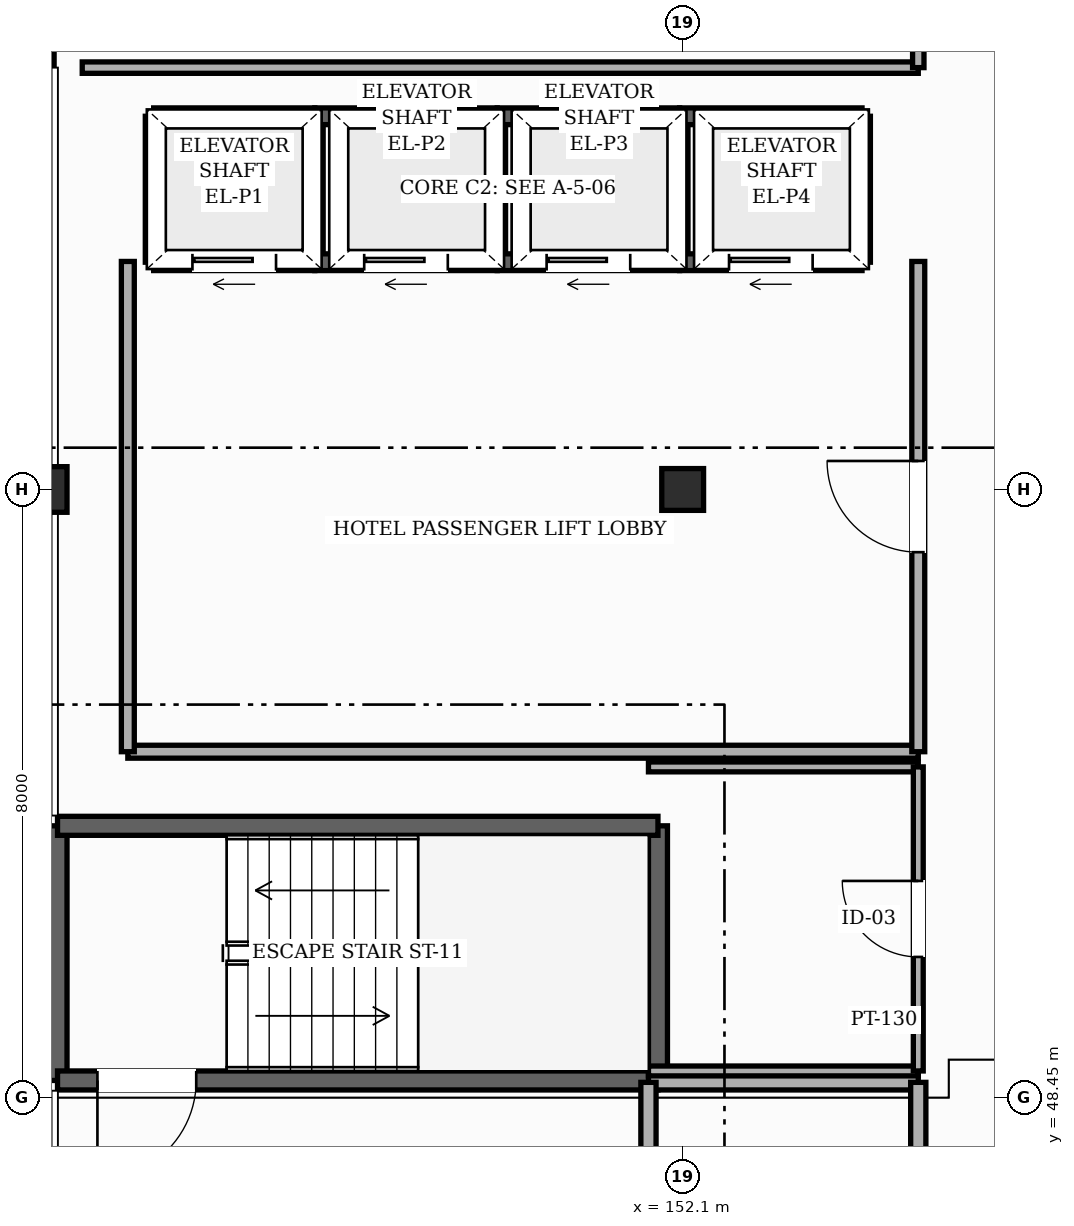
"""IFC4 building model, lengths in metres.
Left out: names, types, materials, properties, quantities, classifications, styles, units other than length and angle.
Written with IfcOpenShell. Run it as: python <this file> out.ifc"""

import sys

from ifc_helpers import new_model, si_unit, direction, frame, frame_2d, origin, origin_2d, place, context, subcontext, project, spatial, rectangle, hollow_rectangle, extrude, element, fill, save


model = new_model("IFC4")
c1 = context("Model", 3, precision=1e-05, world=origin(), true_north=direction((0.0, 1.0)))
c2 = subcontext(c1, "Body", "Model", "MODEL_VIEW")
j1 = project(units=[si_unit("LENGTHUNIT", "METRE"), si_unit("PLANEANGLEUNIT", "RADIAN")], contexts=[c1])
p1 = place(None, origin())
s1 = spatial("IfcSite", under=j1, at=p1, CompositionType="ELEMENT")
p2 = place(p1, origin())
s2 = spatial("IfcBuilding", under=s1, at=p2, CompositionType="ELEMENT")
p3 = place(p2, frame((0.0, 0.0, 24.6)))
s3 = spatial("IfcBuildingStorey", under=s2, at=p3, CompositionType="ELEMENT", Elevation=24.6)
p4 = place(p3, frame((143.7, 56.45, 0.0), z_axis=(0.0, 0.0, 1.0), x_axis=(1.0, 0.0, 0.0)))
e1 = element("IfcColumn", 1, at=p4, inside=s3, PredefinedType="COLUMN", context=c2, shape_type="SweptSolid", body=[
    extrude(hollow_rectangle(XDim=0.6, YDim=0.6, WallThickness=0.025, InnerFilletRadius=0.025, OuterFilletRadius=0.05, at=origin_2d()), origin(), (0.0, 0.0, 1.0), 3.6),
])
p5 = place(p3, frame((152.1, 56.45, 0.0), z_axis=(0.0, 0.0, 1.0), x_axis=(1.0, 0.0, 0.0)))
e2 = element("IfcColumn", 2, at=p5, inside=s3, PredefinedType="COLUMN", context=c2, shape_type="SweptSolid", body=[
    extrude(hollow_rectangle(XDim=0.55, YDim=0.55, WallThickness=0.022, InnerFilletRadius=0.022, OuterFilletRadius=0.044, at=origin_2d()), origin(), (0.0, 0.0, 1.0), 3.6),
])
p6 = place(p3, frame((143.7, 62.0, 0.0), z_axis=(0.0, 0.0, 1.0), x_axis=(0.0, 1.0, 0.0)))
e3 = element("IfcWall", 3, at=p6, inside=s3, PredefinedType="SOLIDWALL", context=c2, shape_type="SweptSolid", body=[
    extrude(rectangle(XDim=2.15, YDim=0.26, at=frame_2d((1.075, 0.0))), origin(), (0.0, 0.0, 1.0), 2.805),
])
p7 = place(p6, frame((0.15, 0.0, 0.85)))
e4 = element("IfcOpeningElement", 4, at=p7, cuts=e3, PredefinedType="OPENING", context=c2, shape_type="SweptSolid", body=[
    extrude(rectangle(XDim=1.85, YDim=1.35, at=frame_2d((0.925, 0.675))), frame((0.0, 0.14, 0.0), z_axis=(0.0, -1.0, 0.0), x_axis=(1.0, 0.0, 0.0)), (0.0, 0.0, 1.0), 0.28),
])
for number, where, z_axis, x_axis in (
    (5, (143.875, 48.675, 0.0), (0.0, 0.0, 1.0), (0.0, 1.0, 0.0)),
    (6, (151.775, 52.025, 0.0), (0.0, 0.0, 1.0), (0.0, -1.0, 0.0)),
):
    element("IfcWall", number, at=place(p3, frame(where, z_axis=z_axis, x_axis=x_axis)), inside=s3, PredefinedType="SHEAR", context=c2, shape_type="SweptSolid", body=[
        extrude(rectangle(XDim=3.35, YDim=0.25, at=frame_2d((1.675, 0.0))), origin(), (0.0, 0.0, 1.0), 3.38),
    ])
p8 = place(p3, frame((151.775, 48.675, 0.0), z_axis=(0.0, 0.0, 1.0), x_axis=(-1.0, 0.0, 0.0)))
e7 = element("IfcWall", 7, at=p8, inside=s3, PredefinedType="SHEAR", context=c2, shape_type="SweptSolid", body=[
    extrude(rectangle(XDim=7.9, YDim=0.25, at=frame_2d((3.95, 0.0))), origin(), (0.0, 0.0, 1.0), 3.38),
])
p9 = place(p8, frame((6.075, 0.0, 0.0)))
e8 = element("IfcOpeningElement", 8, at=p9, cuts=e7, PredefinedType="OPENING", context=c2, shape_type="SweptSolid", body=[
    extrude(rectangle(XDim=1.3, YDim=2.2, at=frame_2d((0.65, 1.1))), frame((0.0, 0.135, 0.0), z_axis=(0.0, -1.0, 0.0), x_axis=(1.0, 0.0, 0.0)), (0.0, 0.0, 1.0), 0.27),
])
p10 = place(p3, frame((143.875, 52.025, 0.0), z_axis=(0.0, 0.0, 1.0), x_axis=(1.0, 0.0, 0.0)))
e9 = element("IfcWall", 9, at=p10, inside=s3, PredefinedType="SHEAR", context=c2, shape_type="SweptSolid", body=[
    extrude(rectangle(XDim=7.9, YDim=0.25, at=frame_2d((3.95, 0.0))), origin(), (0.0, 0.0, 1.0), 3.38),
])
p11 = place(p3, frame((145.14, 61.36, 0.0), z_axis=(0.0, 0.0, 1.0), x_axis=(1.0, 0.0, 0.0)))
e10 = element("IfcWall", 10, at=p11, inside=s3, PredefinedType="SHEAR", context=c2, shape_type="SweptSolid", body=[
    extrude(rectangle(XDim=2.12, YDim=0.22, at=frame_2d((1.06, 0.0))), origin(), (0.0, 0.0, 1.0), 3.38),
])
p12 = place(p3, frame((145.14, 59.44, 0.0), z_axis=(0.0, 0.0, 1.0), x_axis=(1.0, 0.0, 0.0)))
e11 = element("IfcWall", 11, at=p12, inside=s3, PredefinedType="SHEAR", context=c2, shape_type="SweptSolid", body=[
    extrude(rectangle(XDim=2.12, YDim=0.22, at=frame_2d((1.06, 0.0))), origin(), (0.0, 0.0, 1.0), 3.38),
])
p13 = place(p12, frame((0.51, 0.0, 0.0)))
e12 = element("IfcOpeningElement", 12, at=p13, cuts=e11, PredefinedType="OPENING", context=c2, shape_type="SweptSolid", body=[
    extrude(rectangle(XDim=1.1, YDim=2.2, at=frame_2d((0.55, 1.1))), frame((0.0, 0.12, 0.0), z_axis=(0.0, -1.0, 0.0), x_axis=(1.0, 0.0, 0.0)), (0.0, 0.0, 1.0), 0.24),
])
for number, where, z_axis, x_axis in (
    (13, (147.26, 59.44, 0.0), (0.0, 0.0, 1.0), (0.0, 1.0, 0.0)),
    (14, (145.14, 59.44, 0.0), (0.0, 0.0, 1.0), (0.0, 1.0, 0.0)),
):
    element("IfcWall", number, at=place(p3, frame(where, z_axis=z_axis, x_axis=x_axis)), inside=s3, PredefinedType="SHEAR", context=c2, shape_type="SweptSolid", body=[
        extrude(rectangle(XDim=1.92, YDim=0.22, at=frame_2d((0.96, 0.0))), origin(), (0.0, 0.0, 1.0), 3.38),
    ])
p14 = place(p3, frame((147.26, 61.36, 0.0), z_axis=(0.0, 0.0, 1.0), x_axis=(1.0, 0.0, 0.0)))
e15 = element("IfcWall", 15, at=p14, inside=s3, PredefinedType="SHEAR", context=c2, shape_type="SweptSolid", body=[
    extrude(rectangle(XDim=2.4, YDim=0.22, at=frame_2d((1.2, 0.0))), origin(), (0.0, 0.0, 1.0), 3.38),
])
p15 = place(p3, frame((147.26, 59.44, 0.0), z_axis=(0.0, 0.0, 1.0), x_axis=(1.0, 0.0, 0.0)))
e16 = element("IfcWall", 16, at=p15, inside=s3, PredefinedType="SHEAR", context=c2, shape_type="SweptSolid", body=[
    extrude(rectangle(XDim=2.4, YDim=0.22, at=frame_2d((1.2, 0.0))), origin(), (0.0, 0.0, 1.0), 3.38),
])
p16 = place(p15, frame((0.65, 0.0, 0.0)))
e17 = element("IfcOpeningElement", 17, at=p16, cuts=e16, PredefinedType="OPENING", context=c2, shape_type="SweptSolid", body=[
    extrude(rectangle(XDim=1.1, YDim=2.2, at=frame_2d((0.55, 1.1))), frame((0.0, 0.12, 0.0), z_axis=(0.0, -1.0, 0.0), x_axis=(1.0, 0.0, 0.0)), (0.0, 0.0, 1.0), 0.24),
])
p17 = place(p3, frame((149.66, 59.44, 0.0), z_axis=(0.0, 0.0, 1.0), x_axis=(0.0, 1.0, 0.0)))
e18 = element("IfcWall", 18, at=p17, inside=s3, PredefinedType="SHEAR", context=c2, shape_type="SweptSolid", body=[
    extrude(rectangle(XDim=1.92, YDim=0.22, at=frame_2d((0.96, 0.0))), origin(), (0.0, 0.0, 1.0), 3.38),
])
p18 = place(p3, frame((149.66, 61.36, 0.0), z_axis=(0.0, 0.0, 1.0), x_axis=(1.0, 0.0, 0.0)))
e19 = element("IfcWall", 19, at=p18, inside=s3, PredefinedType="SHEAR", context=c2, shape_type="SweptSolid", body=[
    extrude(rectangle(XDim=2.4, YDim=0.22, at=frame_2d((1.2, 0.0))), origin(), (0.0, 0.0, 1.0), 3.38),
])
p19 = place(p3, frame((149.66, 59.44, 0.0), z_axis=(0.0, 0.0, 1.0), x_axis=(1.0, 0.0, 0.0)))
e20 = element("IfcWall", 20, at=p19, inside=s3, PredefinedType="SHEAR", context=c2, shape_type="SweptSolid", body=[
    extrude(rectangle(XDim=2.4, YDim=0.22, at=frame_2d((1.2, 0.0))), origin(), (0.0, 0.0, 1.0), 3.38),
])
p20 = place(p19, frame((0.65, 0.0, 0.0)))
e21 = element("IfcOpeningElement", 21, at=p20, cuts=e20, PredefinedType="OPENING", context=c2, shape_type="SweptSolid", body=[
    extrude(rectangle(XDim=1.1, YDim=2.2, at=frame_2d((0.55, 1.1))), frame((0.0, 0.12, 0.0), z_axis=(0.0, -1.0, 0.0), x_axis=(1.0, 0.0, 0.0)), (0.0, 0.0, 1.0), 0.24),
])
p21 = place(p3, frame((152.06, 59.44, 0.0), z_axis=(0.0, 0.0, 1.0), x_axis=(0.0, 1.0, 0.0)))
e22 = element("IfcWall", 22, at=p21, inside=s3, PredefinedType="SHEAR", context=c2, shape_type="SweptSolid", body=[
    extrude(rectangle(XDim=1.92, YDim=0.22, at=frame_2d((0.96, 0.0))), origin(), (0.0, 0.0, 1.0), 3.38),
])
p22 = place(p3, frame((152.06, 61.36, 0.0), z_axis=(0.0, 0.0, 1.0), x_axis=(1.0, 0.0, 0.0)))
e23 = element("IfcWall", 23, at=p22, inside=s3, PredefinedType="SHEAR", context=c2, shape_type="SweptSolid", body=[
    extrude(rectangle(XDim=2.4, YDim=0.22, at=frame_2d((1.2, 0.0))), origin(), (0.0, 0.0, 1.0), 3.38),
])
p23 = place(p3, frame((152.06, 59.44, 0.0), z_axis=(0.0, 0.0, 1.0), x_axis=(1.0, 0.0, 0.0)))
e24 = element("IfcWall", 24, at=p23, inside=s3, PredefinedType="SHEAR", context=c2, shape_type="SweptSolid", body=[
    extrude(rectangle(XDim=2.4, YDim=0.22, at=frame_2d((1.2, 0.0))), origin(), (0.0, 0.0, 1.0), 3.38),
])
p24 = place(p23, frame((0.65, 0.0, 0.0)))
e25 = element("IfcOpeningElement", 25, at=p24, cuts=e24, PredefinedType="OPENING", context=c2, shape_type="SweptSolid", body=[
    extrude(rectangle(XDim=1.1, YDim=2.2, at=frame_2d((0.55, 1.1))), frame((0.0, 0.12, 0.0), z_axis=(0.0, -1.0, 0.0), x_axis=(1.0, 0.0, 0.0)), (0.0, 0.0, 1.0), 0.24),
])
p25 = place(p3, frame((154.46, 59.44, 0.0), z_axis=(0.0, 0.0, 1.0), x_axis=(0.0, 1.0, 0.0)))
e26 = element("IfcWall", 26, at=p25, inside=s3, PredefinedType="SHEAR", context=c2, shape_type="SweptSolid", body=[
    extrude(rectangle(XDim=1.92, YDim=0.22, at=frame_2d((0.96, 0.0))), origin(), (0.0, 0.0, 1.0), 3.38),
])
p26 = place(p3, frame((151.65, 48.65, 0.0), z_axis=(0.0, 0.0, 1.0), x_axis=(1.0, 0.0, 0.0)))
e27 = element("IfcWall", 27, at=p26, inside=s3, PredefinedType="SOLIDWALL", context=c2, shape_type="SweptSolid", body=[
    extrude(rectangle(XDim=3.55, YDim=0.2, at=frame_2d((1.775, 0.0))), origin(), (0.0, 0.0, 1.0), 3.365),
])
for number, where, z_axis, x_axis in (
    (28, (151.65, 48.8, 0.0), (0.0, 0.0, 1.0), (1.0, 0.0, 0.0)),
    (29, (151.65, 52.8, 0.0), (0.0, 0.0, 1.0), (1.0, 0.0, 0.0)),
):
    element("IfcWall", number, at=place(p3, frame(where, z_axis=z_axis, x_axis=x_axis)), inside=s3, PredefinedType="PARTITIONING", context=c2, shape_type="SweptSolid", body=[
        extrude(rectangle(XDim=3.55, YDim=0.13, at=frame_2d((1.775, 0.0))), origin(), (0.0, 0.0, 1.0), 3.365),
    ])
p27 = place(p3, frame((144.8, 53.0, 0.0), z_axis=(0.0, 0.0, 1.0), x_axis=(1.0, 0.0, 0.0)))
e30 = element("IfcWall", 30, at=p27, inside=s3, PredefinedType="PARTITIONING", context=c2, shape_type="SweptSolid", body=[
    extrude(rectangle(XDim=10.4, YDim=0.17, at=frame_2d((5.2, 0.0))), origin(), (0.0, 0.0, 1.0), 3.365),
])
p28 = place(p3, frame((144.2, 62.0, 0.0), z_axis=(0.0, 0.0, 1.0), x_axis=(1.0, 0.0, 0.0)))
e31 = element("IfcWall", 31, at=p28, inside=s3, PredefinedType="PARTITIONING", context=c2, shape_type="SweptSolid", body=[
    extrude(rectangle(XDim=11.0, YDim=0.15, at=frame_2d((5.5, 0.0))), origin(), (0.0, 0.0, 1.0), 3.365),
])
p29 = place(p3, frame((144.8, 53.0, 0.0), z_axis=(0.0, 0.0, 1.0), x_axis=(0.0, 1.0, 0.0)))
e32 = element("IfcWall", 32, at=p29, inside=s3, PredefinedType="PARTITIONING", context=c2, shape_type="SweptSolid", body=[
    extrude(rectangle(XDim=6.45, YDim=0.17, at=frame_2d((3.225, 0.0))), origin(), (0.0, 0.0, 1.0), 3.365),
])
p30 = place(p3, frame((151.65, 44.1, 0.0), z_axis=(0.0, 0.0, 1.0), x_axis=(0.0, 1.0, 0.0)))
e33 = element("IfcWall", 33, at=p30, inside=s3, PredefinedType="SOLIDWALL", context=c2, shape_type="SweptSolid", body=[
    extrude(rectangle(XDim=4.55, YDim=0.2, at=frame_2d((2.275, 0.0))), origin(), (0.0, 0.0, 1.0), 3.365),
])
p31 = place(p30, frame((1.625, 0.0, 0.0)))
e34 = element("IfcOpeningElement", 34, at=p31, cuts=e33, PredefinedType="OPENING", context=c2, shape_type="SweptSolid", body=[
    extrude(rectangle(XDim=1.3, YDim=2.2, at=frame_2d((0.65, 1.1))), frame((0.0, 0.11, 0.0), z_axis=(0.0, -1.0, 0.0), x_axis=(1.0, 0.0, 0.0)), (0.0, 0.0, 1.0), 0.22),
])
p32 = place(p3, frame((155.2, 44.1, 0.0), z_axis=(0.0, 0.0, 1.0), x_axis=(0.0, 1.0, 0.0)))
e35 = element("IfcWall", 35, at=p32, inside=s3, PredefinedType="SOLIDWALL", context=c2, shape_type="SweptSolid", body=[
    extrude(rectangle(XDim=4.55, YDim=0.2, at=frame_2d((2.275, 0.0))), origin(), (0.0, 0.0, 1.0), 3.365),
])
p33 = place(p32, frame((1.625, 0.0, 0.0)))
e36 = element("IfcOpeningElement", 36, at=p33, cuts=e35, PredefinedType="OPENING", context=c2, shape_type="SweptSolid", body=[
    extrude(rectangle(XDim=1.3, YDim=2.2, at=frame_2d((0.65, 1.1))), frame((0.0, 0.11, 0.0), z_axis=(0.0, -1.0, 0.0), x_axis=(1.0, 0.0, 0.0)), (0.0, 0.0, 1.0), 0.22),
])
p34 = place(p3, frame((155.2, 48.8, 0.0), z_axis=(0.0, 0.0, 1.0), x_axis=(0.0, 1.0, 0.0)))
e37 = element("IfcWall", 37, at=p34, inside=s3, PredefinedType="PARTITIONING", context=c2, shape_type="SweptSolid", body=[
    extrude(rectangle(XDim=4.0, YDim=0.13, at=frame_2d((2.0, 0.0))), origin(), (0.0, 0.0, 1.0), 3.365),
])
p35 = place(p34, frame((1.5, 0.0, 0.0)))
e38 = element("IfcOpeningElement", 38, at=p35, cuts=e37, PredefinedType="OPENING", context=c2, shape_type="SweptSolid", body=[
    extrude(rectangle(XDim=1.0, YDim=2.18, at=frame_2d((0.5, 1.09))), frame((0.0, 0.075, 0.0), z_axis=(0.0, -1.0, 0.0), x_axis=(1.0, 0.0, 0.0)), (0.0, 0.0, 1.0), 0.15),
])
p36 = place(p3, frame((155.2, 53.0, 0.0), z_axis=(0.0, 0.0, 1.0), x_axis=(0.0, 1.0, 0.0)))
e39 = element("IfcWall", 39, at=p36, inside=s3, PredefinedType="PARTITIONING", context=c2, shape_type="SweptSolid", body=[
    extrude(rectangle(XDim=6.45, YDim=0.17, at=frame_2d((3.225, 0.0))), origin(), (0.0, 0.0, 1.0), 3.365),
])
p37 = place(p36, frame((2.625, 0.0, 0.0)))
e40 = element("IfcOpeningElement", 40, at=p37, cuts=e39, PredefinedType="OPENING", context=c2, shape_type="SweptSolid", body=[
    extrude(rectangle(XDim=1.2, YDim=2.2, at=frame_2d((0.6, 1.1))), frame((0.0, 0.095, 0.0), z_axis=(0.0, -1.0, 0.0), x_axis=(1.0, 0.0, 0.0)), (0.0, 0.0, 1.0), 0.19),
])
p38 = place(p3, frame((155.2, 62.0, 0.0), z_axis=(0.0, 0.0, 1.0), x_axis=(0.0, 1.0, 0.0)))
e41 = element("IfcWall", 41, at=p38, inside=s3, PredefinedType="PARTITIONING", context=c2, shape_type="SweptSolid", body=[
    extrude(rectangle(XDim=42.6, YDim=0.15, at=frame_2d((21.3, 0.0))), origin(), (0.0, 0.0, 1.0), 3.365),
])
p39 = place(p38, frame((0.4, 0.0, 0.0)))
e42 = element("IfcOpeningElement", 42, at=p39, cuts=e41, PredefinedType="OPENING", context=c2, shape_type="SweptSolid", body=[
    extrude(rectangle(XDim=0.95, YDim=2.15, at=frame_2d((0.475, 1.075))), frame((0.0, 0.085, 0.0), z_axis=(0.0, -1.0, 0.0), x_axis=(1.0, 0.0, 0.0)), (0.0, 0.0, 1.0), 0.17),
])
p40 = place(p38, frame((3.445, 0.0, 0.0)))
e43 = element("IfcOpeningElement", 43, at=p40, cuts=e41, PredefinedType="OPENING", context=c2, shape_type="SweptSolid", body=[
    extrude(rectangle(XDim=0.95, YDim=2.15, at=frame_2d((0.475, 1.075))), frame((0.0, 0.085, 0.0), z_axis=(0.0, -1.0, 0.0), x_axis=(1.0, 0.0, 0.0)), (0.0, 0.0, 1.0), 0.17),
])
p41 = place(p38, frame((6.485, 0.0, 0.0)))
e44 = element("IfcOpeningElement", 44, at=p41, cuts=e41, PredefinedType="OPENING", context=c2, shape_type="SweptSolid", body=[
    extrude(rectangle(XDim=0.95, YDim=2.15, at=frame_2d((0.475, 1.075))), frame((0.0, 0.085, 0.0), z_axis=(0.0, -1.0, 0.0), x_axis=(1.0, 0.0, 0.0)), (0.0, 0.0, 1.0), 0.17),
])
p42 = place(p38, frame((9.53, 0.0, 0.0)))
e45 = element("IfcOpeningElement", 45, at=p42, cuts=e41, PredefinedType="OPENING", context=c2, shape_type="SweptSolid", body=[
    extrude(rectangle(XDim=0.95, YDim=2.15, at=frame_2d((0.475, 1.075))), frame((0.0, 0.085, 0.0), z_axis=(0.0, -1.0, 0.0), x_axis=(1.0, 0.0, 0.0)), (0.0, 0.0, 1.0), 0.17),
])
p43 = place(p38, frame((12.57, 0.0, 0.0)))
e46 = element("IfcOpeningElement", 46, at=p43, cuts=e41, PredefinedType="OPENING", context=c2, shape_type="SweptSolid", body=[
    extrude(rectangle(XDim=0.95, YDim=2.15, at=frame_2d((0.475, 1.075))), frame((0.0, 0.085, 0.0), z_axis=(0.0, -1.0, 0.0), x_axis=(1.0, 0.0, 0.0)), (0.0, 0.0, 1.0), 0.17),
])
p44 = place(p38, frame((15.615, 0.0, 0.0)))
e47 = element("IfcOpeningElement", 47, at=p44, cuts=e41, PredefinedType="OPENING", context=c2, shape_type="SweptSolid", body=[
    extrude(rectangle(XDim=0.95, YDim=2.15, at=frame_2d((0.475, 1.075))), frame((0.0, 0.085, 0.0), z_axis=(0.0, -1.0, 0.0), x_axis=(1.0, 0.0, 0.0)), (0.0, 0.0, 1.0), 0.17),
])
p45 = place(p38, frame((18.655, 0.0, 0.0)))
e48 = element("IfcOpeningElement", 48, at=p45, cuts=e41, PredefinedType="OPENING", context=c2, shape_type="SweptSolid", body=[
    extrude(rectangle(XDim=0.95, YDim=2.15, at=frame_2d((0.475, 1.075))), frame((0.0, 0.085, 0.0), z_axis=(0.0, -1.0, 0.0), x_axis=(1.0, 0.0, 0.0)), (0.0, 0.0, 1.0), 0.17),
])
p46 = place(p38, frame((21.7, 0.0, 0.0)))
e49 = element("IfcOpeningElement", 49, at=p46, cuts=e41, PredefinedType="OPENING", context=c2, shape_type="SweptSolid", body=[
    extrude(rectangle(XDim=0.95, YDim=2.15, at=frame_2d((0.475, 1.075))), frame((0.0, 0.085, 0.0), z_axis=(0.0, -1.0, 0.0), x_axis=(1.0, 0.0, 0.0)), (0.0, 0.0, 1.0), 0.17),
])
p47 = place(p38, frame((24.745, 0.0, 0.0)))
e50 = element("IfcOpeningElement", 50, at=p47, cuts=e41, PredefinedType="OPENING", context=c2, shape_type="SweptSolid", body=[
    extrude(rectangle(XDim=0.95, YDim=2.15, at=frame_2d((0.475, 1.075))), frame((0.0, 0.085, 0.0), z_axis=(0.0, -1.0, 0.0), x_axis=(1.0, 0.0, 0.0)), (0.0, 0.0, 1.0), 0.17),
])
p48 = place(p38, frame((27.785, 0.0, 0.0)))
e51 = element("IfcOpeningElement", 51, at=p48, cuts=e41, PredefinedType="OPENING", context=c2, shape_type="SweptSolid", body=[
    extrude(rectangle(XDim=0.95, YDim=2.15, at=frame_2d((0.475, 1.075))), frame((0.0, 0.085, 0.0), z_axis=(0.0, -1.0, 0.0), x_axis=(1.0, 0.0, 0.0)), (0.0, 0.0, 1.0), 0.17),
])
p49 = place(p38, frame((30.83, 0.0, 0.0)))
e52 = element("IfcOpeningElement", 52, at=p49, cuts=e41, PredefinedType="OPENING", context=c2, shape_type="SweptSolid", body=[
    extrude(rectangle(XDim=0.95, YDim=2.15, at=frame_2d((0.475, 1.075))), frame((0.0, 0.085, 0.0), z_axis=(0.0, -1.0, 0.0), x_axis=(1.0, 0.0, 0.0)), (0.0, 0.0, 1.0), 0.17),
])
p50 = place(p38, frame((33.87, 0.0, 0.0)))
e53 = element("IfcOpeningElement", 53, at=p50, cuts=e41, PredefinedType="OPENING", context=c2, shape_type="SweptSolid", body=[
    extrude(rectangle(XDim=0.95, YDim=2.15, at=frame_2d((0.475, 1.075))), frame((0.0, 0.085, 0.0), z_axis=(0.0, -1.0, 0.0), x_axis=(1.0, 0.0, 0.0)), (0.0, 0.0, 1.0), 0.17),
])
p51 = place(p38, frame((36.915, 0.0, 0.0)))
e54 = element("IfcOpeningElement", 54, at=p51, cuts=e41, PredefinedType="OPENING", context=c2, shape_type="SweptSolid", body=[
    extrude(rectangle(XDim=0.95, YDim=2.15, at=frame_2d((0.475, 1.075))), frame((0.0, 0.085, 0.0), z_axis=(0.0, -1.0, 0.0), x_axis=(1.0, 0.0, 0.0)), (0.0, 0.0, 1.0), 0.17),
])
p52 = place(p38, frame((39.955, 0.0, 0.0)))
e55 = element("IfcOpeningElement", 55, at=p52, cuts=e41, PredefinedType="OPENING", context=c2, shape_type="SweptSolid", body=[
    extrude(rectangle(XDim=0.95, YDim=2.15, at=frame_2d((0.475, 1.075))), frame((0.0, 0.085, 0.0), z_axis=(0.0, -1.0, 0.0), x_axis=(1.0, 0.0, 0.0)), (0.0, 0.0, 1.0), 0.17),
])
p53 = place(p9, origin())
e56 = element("IfcDoor", 56, at=p53, inside=s3, OperationType="SINGLE_SWING_RIGHT", PredefinedType="DOOR", context=c2, shape_type="SweptSolid", body=[
    extrude(rectangle(XDim=1.3, YDim=2.2, at=frame_2d((0.65, 1.1))), frame((0.0, 0.025, 0.0), z_axis=(0.0, -1.0, 0.0), x_axis=(1.0, 0.0, 0.0)), (0.0, 0.0, 1.0), 0.05),
])
fill(e8, e56)
p54 = place(p13, origin())
e57 = element("IfcDoor", 57, at=p54, inside=s3, OperationType="SLIDING_TO_LEFT", PredefinedType="DOOR", context=c2, shape_type="SweptSolid", body=[
    extrude(rectangle(XDim=1.1, YDim=2.2, at=frame_2d((0.55, 1.1))), frame((0.0, 0.025, 0.0), z_axis=(0.0, -1.0, 0.0), x_axis=(1.0, 0.0, 0.0)), (0.0, 0.0, 1.0), 0.05),
])
fill(e12, e57)
p55 = place(p16, origin())
e58 = element("IfcDoor", 58, at=p55, inside=s3, OperationType="SLIDING_TO_LEFT", PredefinedType="DOOR", context=c2, shape_type="SweptSolid", body=[
    extrude(rectangle(XDim=1.1, YDim=2.2, at=frame_2d((0.55, 1.1))), frame((0.0, 0.025, 0.0), z_axis=(0.0, -1.0, 0.0), x_axis=(1.0, 0.0, 0.0)), (0.0, 0.0, 1.0), 0.05),
])
fill(e17, e58)
p56 = place(p20, origin())
e59 = element("IfcDoor", 59, at=p56, inside=s3, OperationType="SLIDING_TO_LEFT", PredefinedType="DOOR", context=c2, shape_type="SweptSolid", body=[
    extrude(rectangle(XDim=1.1, YDim=2.2, at=frame_2d((0.55, 1.1))), frame((0.0, 0.025, 0.0), z_axis=(0.0, -1.0, 0.0), x_axis=(1.0, 0.0, 0.0)), (0.0, 0.0, 1.0), 0.05),
])
fill(e21, e59)
p57 = place(p24, origin())
e60 = element("IfcDoor", 60, at=p57, inside=s3, OperationType="SLIDING_TO_LEFT", PredefinedType="DOOR", context=c2, shape_type="SweptSolid", body=[
    extrude(rectangle(XDim=1.1, YDim=2.2, at=frame_2d((0.55, 1.1))), frame((0.0, 0.025, 0.0), z_axis=(0.0, -1.0, 0.0), x_axis=(1.0, 0.0, 0.0)), (0.0, 0.0, 1.0), 0.05),
])
fill(e25, e60)
p58 = place(p37, origin())
e61 = element("IfcDoor", 61, at=p58, inside=s3, OperationType="SINGLE_SWING_RIGHT", PredefinedType="DOOR", context=c2, shape_type="SweptSolid", body=[
    extrude(rectangle(XDim=1.2, YDim=2.2, at=frame_2d((0.6, 1.1))), frame((0.0, 0.025, 0.0), z_axis=(0.0, -1.0, 0.0), x_axis=(1.0, 0.0, 0.0)), (0.0, 0.0, 1.0), 0.05),
])
fill(e40, e61)
p59 = place(p35, origin())
e62 = element("IfcDoor", 62, at=p59, inside=s3, OperationType="SINGLE_SWING_RIGHT", PredefinedType="DOOR", context=c2, shape_type="SweptSolid", body=[
    extrude(rectangle(XDim=1.0, YDim=2.18, at=frame_2d((0.5, 1.09))), frame((0.0, 0.025, 0.0), z_axis=(0.0, -1.0, 0.0), x_axis=(1.0, 0.0, 0.0)), (0.0, 0.0, 1.0), 0.05),
])
fill(e38, e62)
save(model, sys.argv[1])
